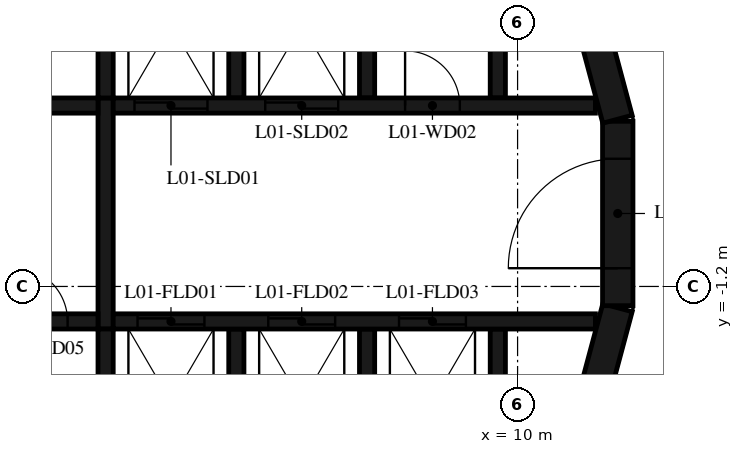
"""IFC4 building model, lengths in metres.
Left out: names, types, materials, properties, quantities, classifications, styles, units other than length and angle.
Written with IfcOpenShell. Run it as: python <this file> out.ifc"""

import sys

from ifc_helpers import new_model, si_unit, direction, frame, frame_2d, origin, place, context, subcontext, project, spatial, polyline, rectangle, outline, extrude, element, fill, save


model = new_model("IFC4")
c1 = context("Model", 3, precision=1e-05, world=origin(), true_north=direction((0.0, 1.0)))
c2 = subcontext(c1, "Body", "Model", "MODEL_VIEW")
j1 = project(units=[si_unit("LENGTHUNIT", "METRE"), si_unit("PLANEANGLEUNIT", "RADIAN")], contexts=[c1])
p1 = place(None, origin())
s1 = spatial("IfcSite", under=j1, at=p1, CompositionType="ELEMENT")
p2 = place(p1, origin())
s2 = spatial("IfcBuilding", under=s1, at=p2, CompositionType="ELEMENT")
p3 = place(p2, frame((0.0, 0.0, 9.0)))
s3 = spatial("IfcBuildingStorey", under=s2, at=p3, CompositionType="ELEMENT", Elevation=9.0)
p4 = place(p3, frame((10.858, -4.479, 0.0), z_axis=(0.0, 0.0, 1.0), x_axis=(0.258734743916, 0.965948410781, 0.0)))
e1 = element("IfcWall", 1, at=p4, inside=s3, PredefinedType="SHEAR", context=c2, shape_type="SweptSolid", body=[
    extrude(rectangle(XDim=3.033, YDim=0.5, at=frame_2d((1.516, 0.0))), origin(), (0.0, 0.0, 1.0), 4.42),
])
p5 = place(p3, frame((11.647, -1.516, 0.0), z_axis=(0.0, 0.0, 1.0), x_axis=(0.0, 1.0, 0.0)))
e2 = element("IfcWall", 2, at=p5, inside=s3, PredefinedType="SHEAR", context=c2, shape_type="SweptSolid", body=[
    extrude(rectangle(XDim=3.033, YDim=0.5, at=frame_2d((1.516, 0.0))), origin(), (0.0, 0.0, 1.0), 4.42),
])
p6 = place(p5, frame((0.616, 0.0, 0.0)))
e3 = element("IfcOpeningElement", 3, at=p6, cuts=e2, PredefinedType="OPENING", context=c2, shape_type="SweptSolid", body=[
    extrude(rectangle(XDim=1.8, YDim=2.1, at=frame_2d((0.9, 1.05))), frame((0.0, 0.26, 0.0), z_axis=(0.0, -1.0, 0.0), x_axis=(1.0, 0.0, 0.0)), (0.0, 0.0, 1.0), 0.52),
])
p7 = place(p3, frame((11.643, 1.55, 0.0), z_axis=(0.0, 0.0, 1.0), x_axis=(-0.258734743916, 0.965948410781, 0.0)))
e4 = element("IfcWall", 4, at=p7, inside=s3, PredefinedType="SHEAR", context=c2, shape_type="SweptSolid", body=[
    extrude(rectangle(XDim=3.033, YDim=0.5, at=frame_2d((1.516, 0.0))), origin(), (0.0, 0.0, 1.0), 4.42),
])
p8 = place(p3, origin())
e5 = element("IfcWall", 5, at=p8, inside=s3, PredefinedType="SHEAR", context=c2, shape_type="SweptSolid", body=[
    extrude(outline(polyline([(-9.55, 4.8), (-7.65, 4.8), (-7.65, 1.9), (-7.4, 1.9), (-7.4, 4.8), (-5.5, 4.8), (-5.5, 1.9), (-5.25, 1.9), (-5.25, 4.8), (-3.35, 4.8), (-3.35, 1.9), (-3.1, 1.9), (-3.1, 4.8), (-1.2, 4.8), (-1.2, 1.9), (-0.95, 1.9), (-0.95, 4.8), (3.1, 4.8), (3.1, 1.9), (3.35, 1.9), (3.35, 4.8), (5.25, 4.8), (5.25, 1.9), (5.5, 1.9), (5.5, 4.8), (7.4, 4.8), (7.4, 1.9), (7.65, 1.9), (7.65, 4.8), (9.55, 4.8), (9.55, 1.9), (9.8, 1.9), (9.8, 4.8), (9.8, 5.05), (-9.8, 5.05), (-9.8, 4.8), (-9.8, 1.9), (-9.55, 1.9), (-9.55, 4.8)])), origin(), (0.0, 0.0, 1.0), 4.42),
])
p9 = place(p3, origin())
e6 = element("IfcWall", 6, at=p9, inside=s3, PredefinedType="SHEAR", context=c2, shape_type="SweptSolid", body=[
    extrude(outline(polyline([(9.8, -5.05), (9.8, -4.8), (9.8, -1.9), (9.55, -1.9), (9.55, -4.8), (7.65, -4.8), (7.65, -1.9), (7.4, -1.9), (7.4, -4.8), (5.5, -4.8), (5.5, -1.9), (5.25, -1.9), (5.25, -4.8), (3.35, -4.8), (3.35, -1.9), (3.1, -1.9), (3.1, -4.8), (1.2, -4.8), (1.2, -1.9), (0.95, -1.9), (0.95, -4.8), (-0.95, -4.8), (-0.95, -1.9), (-1.2, -1.9), (-1.2, -4.8), (-5.25, -4.8), (-5.25, -1.9), (-5.5, -1.9), (-5.5, -4.8), (-7.4, -4.8), (-7.4, -1.9), (-7.65, -1.9), (-7.65, -4.8), (-9.55, -4.8), (-9.55, -1.9), (-9.8, -1.9), (-9.8, -4.8), (-9.8, -5.05), (9.8, -5.05)])), origin(), (0.0, 0.0, 1.0), 4.42),
])
p10 = place(p3, frame((-11.28, 1.775, 0.0), z_axis=(0.0, 0.0, 1.0), x_axis=(1.0, 0.0, 0.0)))
e7 = element("IfcWall", 7, at=p10, inside=s3, PredefinedType="SHEAR", context=c2, shape_type="SweptSolid", body=[
    extrude(rectangle(XDim=14.38, YDim=0.25, at=frame_2d((7.19, 0.0))), origin(), (0.0, 0.0, 1.0), 4.42),
])
p11 = place(p10, frame((2.13, 0.0, 0.0)))
e8 = element("IfcOpeningElement", 8, at=p11, cuts=e7, PredefinedType="OPENING", context=c2, shape_type="SweptSolid", body=[
    extrude(rectangle(XDim=1.1, YDim=2.1, at=frame_2d((0.55, 1.05))), frame((0.0, 0.135, 0.0), z_axis=(0.0, -1.0, 0.0), x_axis=(1.0, 0.0, 0.0)), (0.0, 0.0, 1.0), 0.27),
])
p12 = place(p10, frame((4.28, 0.0, 0.0)))
e9 = element("IfcOpeningElement", 9, at=p12, cuts=e7, PredefinedType="OPENING", context=c2, shape_type="SweptSolid", body=[
    extrude(rectangle(XDim=1.1, YDim=2.1, at=frame_2d((0.55, 1.05))), frame((0.0, 0.135, 0.0), z_axis=(0.0, -1.0, 0.0), x_axis=(1.0, 0.0, 0.0)), (0.0, 0.0, 1.0), 0.27),
])
p13 = place(p10, frame((6.43, 0.0, 0.0)))
e10 = element("IfcOpeningElement", 10, at=p13, cuts=e7, PredefinedType="OPENING", context=c2, shape_type="SweptSolid", body=[
    extrude(rectangle(XDim=1.1, YDim=2.1, at=frame_2d((0.55, 1.05))), frame((0.0, 0.135, 0.0), z_axis=(0.0, -1.0, 0.0), x_axis=(1.0, 0.0, 0.0)), (0.0, 0.0, 1.0), 0.27),
])
p14 = place(p10, frame((8.58, 0.0, 0.0)))
e11 = element("IfcOpeningElement", 11, at=p14, cuts=e7, PredefinedType="OPENING", context=c2, shape_type="SweptSolid", body=[
    extrude(rectangle(XDim=1.1, YDim=2.1, at=frame_2d((0.55, 1.05))), frame((0.0, 0.135, 0.0), z_axis=(0.0, -1.0, 0.0), x_axis=(1.0, 0.0, 0.0)), (0.0, 0.0, 1.0), 0.27),
])
p15 = place(p10, frame((11.905, 0.0, 0.0)))
e12 = element("IfcOpeningElement", 12, at=p15, cuts=e7, PredefinedType="OPENING", context=c2, shape_type="SweptSolid", body=[
    extrude(rectangle(XDim=0.9, YDim=2.1, at=frame_2d((0.45, 1.05))), frame((0.0, 0.135, 0.0), z_axis=(0.0, -1.0, 0.0), x_axis=(1.0, 0.0, 0.0)), (0.0, 0.0, 1.0), 0.27),
])
p16 = place(p3, frame((3.35, 1.775, 0.0), z_axis=(0.0, 0.0, 1.0), x_axis=(1.0, 0.0, 0.0)))
e13 = element("IfcWall", 13, at=p16, inside=s3, PredefinedType="SHEAR", context=c2, shape_type="SweptSolid", body=[
    extrude(rectangle(XDim=7.93, YDim=0.25, at=frame_2d((3.965, 0.0))), origin(), (0.0, 0.0, 1.0), 4.42),
])
p17 = place(p16, frame((0.35, 0.0, 0.0)))
e14 = element("IfcOpeningElement", 14, at=p17, cuts=e13, PredefinedType="OPENING", context=c2, shape_type="SweptSolid", body=[
    extrude(rectangle(XDim=1.2, YDim=2.4, at=frame_2d((0.6, 1.2))), frame((0.0, 0.135, 0.0), z_axis=(0.0, -1.0, 0.0), x_axis=(1.0, 0.0, 0.0)), (0.0, 0.0, 1.0), 0.27),
])
p18 = place(p16, frame((2.5, 0.0, 0.0)))
e15 = element("IfcOpeningElement", 15, at=p18, cuts=e13, PredefinedType="OPENING", context=c2, shape_type="SweptSolid", body=[
    extrude(rectangle(XDim=1.2, YDim=2.4, at=frame_2d((0.6, 1.2))), frame((0.0, 0.135, 0.0), z_axis=(0.0, -1.0, 0.0), x_axis=(1.0, 0.0, 0.0)), (0.0, 0.0, 1.0), 0.27),
])
p19 = place(p16, frame((4.8, 0.0, 0.0)))
e16 = element("IfcOpeningElement", 16, at=p19, cuts=e13, PredefinedType="OPENING", context=c2, shape_type="SweptSolid", body=[
    extrude(rectangle(XDim=0.9, YDim=2.1, at=frame_2d((0.45, 1.05))), frame((0.0, 0.135, 0.0), z_axis=(0.0, -1.0, 0.0), x_axis=(1.0, 0.0, 0.0)), (0.0, 0.0, 1.0), 0.27),
])
p20 = place(p3, frame((-11.28, -1.775, 0.0), z_axis=(0.0, 0.0, 1.0), x_axis=(1.0, 0.0, 0.0)))
e17 = element("IfcWall", 17, at=p20, inside=s3, PredefinedType="SHEAR", context=c2, shape_type="SweptSolid", body=[
    extrude(rectangle(XDim=14.38, YDim=0.25, at=frame_2d((7.19, 0.0))), origin(), (0.0, 0.0, 1.0), 4.42),
])
p21 = place(p20, frame((7.605, 0.0, 0.0)))
e18 = element("IfcOpeningElement", 18, at=p21, cuts=e17, PredefinedType="OPENING", context=c2, shape_type="SweptSolid", body=[
    extrude(rectangle(XDim=0.9, YDim=2.1, at=frame_2d((0.45, 1.05))), frame((0.0, 0.135, 0.0), z_axis=(0.0, -1.0, 0.0), x_axis=(1.0, 0.0, 0.0)), (0.0, 0.0, 1.0), 0.27),
])
p22 = place(p20, frame((10.83, 0.0, 0.0)))
e19 = element("IfcOpeningElement", 19, at=p22, cuts=e17, PredefinedType="OPENING", context=c2, shape_type="SweptSolid", body=[
    extrude(rectangle(XDim=0.9, YDim=2.1, at=frame_2d((0.45, 1.05))), frame((0.0, 0.135, 0.0), z_axis=(0.0, -1.0, 0.0), x_axis=(1.0, 0.0, 0.0)), (0.0, 0.0, 1.0), 0.27),
])
p23 = place(p20, frame((12.98, 0.0, 0.0)))
e20 = element("IfcOpeningElement", 20, at=p23, cuts=e17, PredefinedType="OPENING", context=c2, shape_type="SweptSolid", body=[
    extrude(rectangle(XDim=0.9, YDim=2.1, at=frame_2d((0.45, 1.05))), frame((0.0, 0.135, 0.0), z_axis=(0.0, -1.0, 0.0), x_axis=(1.0, 0.0, 0.0)), (0.0, 0.0, 1.0), 0.27),
])
p24 = place(p3, frame((3.35, -1.775, 0.0), z_axis=(0.0, 0.0, 1.0), x_axis=(1.0, 0.0, 0.0)))
e21 = element("IfcWall", 21, at=p24, inside=s3, PredefinedType="SHEAR", context=c2, shape_type="SweptSolid", body=[
    extrude(rectangle(XDim=7.93, YDim=0.25, at=frame_2d((3.965, 0.0))), origin(), (0.0, 0.0, 1.0), 4.42),
])
p25 = place(p24, frame((0.4, 0.0, 0.0)))
e22 = element("IfcOpeningElement", 22, at=p25, cuts=e21, PredefinedType="OPENING", context=c2, shape_type="SweptSolid", body=[
    extrude(rectangle(XDim=1.1, YDim=2.4, at=frame_2d((0.55, 1.2))), frame((0.0, 0.135, 0.0), z_axis=(0.0, -1.0, 0.0), x_axis=(1.0, 0.0, 0.0)), (0.0, 0.0, 1.0), 0.27),
])
p26 = place(p24, frame((2.55, 0.0, 0.0)))
e23 = element("IfcOpeningElement", 23, at=p26, cuts=e21, PredefinedType="OPENING", context=c2, shape_type="SweptSolid", body=[
    extrude(rectangle(XDim=1.1, YDim=2.4, at=frame_2d((0.55, 1.2))), frame((0.0, 0.135, 0.0), z_axis=(0.0, -1.0, 0.0), x_axis=(1.0, 0.0, 0.0)), (0.0, 0.0, 1.0), 0.27),
])
p27 = place(p24, frame((4.7, 0.0, 0.0)))
e24 = element("IfcOpeningElement", 24, at=p27, cuts=e21, PredefinedType="OPENING", context=c2, shape_type="SweptSolid", body=[
    extrude(rectangle(XDim=1.1, YDim=2.4, at=frame_2d((0.55, 1.2))), frame((0.0, 0.135, 0.0), z_axis=(0.0, -1.0, 0.0), x_axis=(1.0, 0.0, 0.0)), (0.0, 0.0, 1.0), 0.27),
])
p28 = place(p3, frame((3.225, -1.9, 0.0), z_axis=(0.0, 0.0, 1.0), x_axis=(0.0, 1.0, 0.0)))
e25 = element("IfcWall", 25, at=p28, inside=s3, PredefinedType="SHEAR", context=c2, shape_type="SweptSolid", body=[
    extrude(rectangle(XDim=3.8, YDim=0.25, at=frame_2d((1.9, 0.0))), origin(), (0.0, 0.0, 1.0), 4.42),
])
p29 = place(p6, origin())
e26 = element("IfcDoor", 26, at=p29, inside=s3, OperationType="DOUBLE_DOOR_SINGLE_SWING", PredefinedType="DOOR", context=c2, shape_type="SweptSolid", body=[
    extrude(rectangle(XDim=1.8, YDim=2.1, at=frame_2d((0.9, 1.05))), frame((0.0, 0.025, 0.0), z_axis=(0.0, -1.0, 0.0), x_axis=(1.0, 0.0, 0.0)), (0.0, 0.0, 1.0), 0.05),
])
fill(e3, e26)
p30 = place(p17, origin())
e27 = element("IfcDoor", 27, at=p30, inside=s3, OperationType="DOUBLE_DOOR_SLIDING", PredefinedType="DOOR", context=c2, shape_type="SweptSolid", body=[
    extrude(rectangle(XDim=1.2, YDim=2.4, at=frame_2d((0.6, 1.2))), frame((0.0, 0.025, 0.0), z_axis=(0.0, -1.0, 0.0), x_axis=(1.0, 0.0, 0.0)), (0.0, 0.0, 1.0), 0.05),
])
fill(e14, e27)
p31 = place(p18, origin())
e28 = element("IfcDoor", 28, at=p31, inside=s3, OperationType="DOUBLE_DOOR_SLIDING", PredefinedType="DOOR", context=c2, shape_type="SweptSolid", body=[
    extrude(rectangle(XDim=1.2, YDim=2.4, at=frame_2d((0.6, 1.2))), frame((0.0, 0.025, 0.0), z_axis=(0.0, -1.0, 0.0), x_axis=(1.0, 0.0, 0.0)), (0.0, 0.0, 1.0), 0.05),
])
fill(e15, e28)
p32 = place(p25, origin())
e29 = element("IfcDoor", 29, at=p32, inside=s3, OperationType="DOUBLE_DOOR_SLIDING", PredefinedType="DOOR", context=c2, shape_type="SweptSolid", body=[
    extrude(rectangle(XDim=1.1, YDim=2.4, at=frame_2d((0.55, 1.2))), frame((0.0, 0.025, 0.0), z_axis=(0.0, -1.0, 0.0), x_axis=(1.0, 0.0, 0.0)), (0.0, 0.0, 1.0), 0.05),
])
fill(e22, e29)
p33 = place(p26, origin())
e30 = element("IfcDoor", 30, at=p33, inside=s3, OperationType="DOUBLE_DOOR_SLIDING", PredefinedType="DOOR", context=c2, shape_type="SweptSolid", body=[
    extrude(rectangle(XDim=1.1, YDim=2.4, at=frame_2d((0.55, 1.2))), frame((0.0, 0.025, 0.0), z_axis=(0.0, -1.0, 0.0), x_axis=(1.0, 0.0, 0.0)), (0.0, 0.0, 1.0), 0.05),
])
fill(e23, e30)
p34 = place(p27, origin())
e31 = element("IfcDoor", 31, at=p34, inside=s3, OperationType="DOUBLE_DOOR_SLIDING", PredefinedType="DOOR", context=c2, shape_type="SweptSolid", body=[
    extrude(rectangle(XDim=1.1, YDim=2.4, at=frame_2d((0.55, 1.2))), frame((0.0, 0.025, 0.0), z_axis=(0.0, -1.0, 0.0), x_axis=(1.0, 0.0, 0.0)), (0.0, 0.0, 1.0), 0.05),
])
fill(e24, e31)
p35 = place(p19, origin())
e32 = element("IfcDoor", 32, at=p35, inside=s3, OperationType="SINGLE_SWING_LEFT", PredefinedType="DOOR", context=c2, shape_type="SweptSolid", body=[
    extrude(rectangle(XDim=0.9, YDim=2.1, at=frame_2d((0.45, 1.05))), frame((0.0, 0.025, 0.0), z_axis=(0.0, -1.0, 0.0), x_axis=(1.0, 0.0, 0.0)), (0.0, 0.0, 1.0), 0.05),
])
fill(e16, e32)
p36 = place(p23, origin())
e33 = element("IfcDoor", 33, at=p36, inside=s3, OperationType="SINGLE_SWING_RIGHT", PredefinedType="DOOR", context=c2, shape_type="SweptSolid", body=[
    extrude(rectangle(XDim=0.9, YDim=2.1, at=frame_2d((0.45, 1.05))), frame((0.0, 0.025, 0.0), z_axis=(0.0, -1.0, 0.0), x_axis=(1.0, 0.0, 0.0)), (0.0, 0.0, 1.0), 0.05),
])
fill(e20, e33)
save(model, sys.argv[1])
